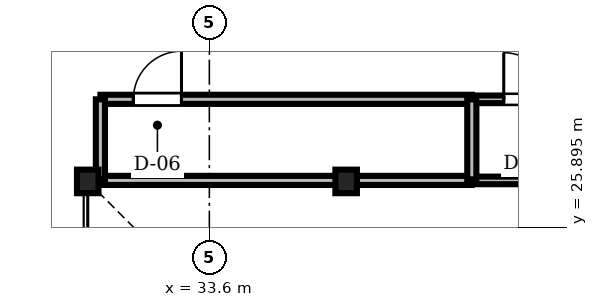
"""IFC4 building model, lengths in metres.
Left out: names, types, materials, properties, quantities, classifications, styles, units other than length and angle.
Written with IfcOpenShell. Run it as: python <this file> out.ifc"""

import sys

from ifc_helpers import new_model, si_unit, direction, frame, frame_2d, origin, origin_2d, place, context, subcontext, project, spatial, rectangle, i_section, extrude, source, transform, mapped, element, fill, save


model = new_model("IFC4")
c1 = context("Model", 3, precision=1e-05, world=origin(), true_north=direction((0.0, 1.0)))
c2 = subcontext(c1, "Body", "Model", "MODEL_VIEW")
j1 = project(units=[si_unit("LENGTHUNIT", "METRE"), si_unit("PLANEANGLEUNIT", "RADIAN")], contexts=[c1])
p1 = place(None, origin())
s1 = spatial("IfcSite", under=j1, at=p1, CompositionType="ELEMENT")
p2 = place(p1, origin())
s2 = spatial("IfcBuilding", under=s1, at=p2, CompositionType="ELEMENT")
p3 = place(p2, frame((0.0, 0.0, 107.5)))
s3 = spatial("IfcBuildingStorey", under=s2, at=p3, CompositionType="ELEMENT", Elevation=107.5)
m1 = source(origin(), c2, "Body", "SweptSolid", [
    extrude(i_section(OverallWidth=0.424, OverallDepth=0.465, WebThickness=0.035, FlangeThickness=0.056, FilletRadius=0.015, at=origin_2d()), origin(), (0.0, 0.0, 1.0), 3.56),
])
for number, where, z_axis, x_axis in (
    (1, (36.3, 26.8, 0.0), (0.0, 0.0, 1.0), (1.0, 0.0, 0.0)),
    (2, (31.2, 26.8, 0.0), (0.0, 0.0, 1.0), (1.0, 0.0, 0.0)),
):
    element("IfcColumn", number, at=place(p3, frame(where, z_axis=z_axis, x_axis=x_axis)), inside=s3, PredefinedType="COLUMN", context=c2, shape_type="MappedRepresentation", body=[
        mapped(m1, transform((0.0, 0.0, 0.0), scale=1.0)),
    ])
m2 = source(origin(), c2, "Body", "SweptSolid", [
    extrude(rectangle(XDim=7.33, YDim=0.18, at=frame_2d((3.665, 0.0))), origin(), (0.0, 0.0, 1.0), 3.192),
])
p4 = place(p3, frame((31.45, 28.42, 0.0), z_axis=(0.0, 0.0, 1.0), x_axis=(1.0, 0.0, 0.0)))
e3 = element("IfcWall", 3, at=p4, inside=s3, PredefinedType="PARTITIONING", context=c2, shape_type="MappedRepresentation", body=[
    mapped(m2, transform((0.0, 0.0, 0.0), scale=1.0)),
])
m3 = source(origin(), c2, "Body", "SweptSolid", [
    extrude(rectangle(XDim=0.95, YDim=2.15, at=frame_2d((0.475, 1.075))), frame((0.0, 0.1, 0.0), z_axis=(0.0, -1.0, 0.0), x_axis=(1.0, 0.0, 0.0)), (0.0, 0.0, 1.0), 0.2),
])
p5 = place(p4, frame((0.65, 0.0, 0.0)))
e4 = element("IfcOpeningElement", 4, at=p5, cuts=e3, PredefinedType="OPENING", context=c2, shape_type="MappedRepresentation", body=[
    mapped(m3, transform((0.0, 0.0, 0.0), scale=1.0)),
])
m4 = source(origin(), c2, "Body", "SweptSolid", [
    extrude(rectangle(XDim=2.74, YDim=0.15, at=frame_2d((1.37, 0.0))), origin(), (0.0, 0.0, 1.0), 3.56),
])
p6 = place(p3, frame((38.78, 28.42, 0.0), z_axis=(0.0, 0.0, 1.0), x_axis=(1.0, 0.0, 0.0)))
e5 = element("IfcWall", 5, at=p6, inside=s3, PredefinedType="PARTITIONING", context=c2, shape_type="MappedRepresentation", body=[
    mapped(m4, transform((0.0, 0.0, 0.0), scale=1.0)),
])
m5 = source(origin(), c2, "Body", "SweptSolid", [
    extrude(rectangle(XDim=0.92, YDim=2.1, at=frame_2d((0.46, 1.05))), frame((0.0, 0.085, 0.0), z_axis=(0.0, -1.0, 0.0), x_axis=(1.0, 0.0, 0.0)), (0.0, 0.0, 1.0), 0.17),
])
p7 = place(p6, frame((0.63, 0.0, 0.0)))
e6 = element("IfcOpeningElement", 6, at=p7, cuts=e5, PredefinedType="OPENING", context=c2, shape_type="MappedRepresentation", body=[
    mapped(m5, transform((0.0, 0.0, 0.0), scale=1.0)),
])
m6 = source(origin(), c2, "Body", "SweptSolid", [
    extrude(rectangle(XDim=7.33, YDim=0.18, at=frame_2d((3.665, 0.0))), origin(), (0.0, 0.0, 1.0), 3.102),
])
p8 = place(p3, frame((31.45, 26.82, 0.0), z_axis=(0.0, 0.0, 1.0), x_axis=(1.0, 0.0, 0.0)))
e7 = element("IfcWall", 7, at=p8, inside=s3, PredefinedType="PARTITIONING", context=c2, shape_type="MappedRepresentation", body=[
    mapped(m6, transform((0.0, 0.0, 0.0), scale=1.0)),
])
m7 = source(origin(), c2, "Body", "SweptSolid", [
    extrude(rectangle(XDim=2.74, YDim=0.15, at=frame_2d((1.37, 0.0))), origin(), (0.0, 0.0, 1.0), 2.952),
])
p9 = place(p3, frame((38.78, 26.82, 0.0), z_axis=(0.0, 0.0, 1.0), x_axis=(1.0, 0.0, 0.0)))
e8 = element("IfcWall", 8, at=p9, inside=s3, PredefinedType="PARTITIONING", context=c2, shape_type="MappedRepresentation", body=[
    mapped(m7, transform((0.0, 0.0, 0.0), scale=1.0)),
])
m8 = source(origin(), c2, "Body", "SweptSolid", [
    extrude(rectangle(XDim=1.6, YDim=0.18, at=frame_2d((0.8, 0.0))), origin(), (0.0, 0.0, 1.0), 3.102),
])
for number, where, z_axis, x_axis in (
    (9, (31.45, 26.82, 0.0), (0.0, 0.0, 1.0), (0.0, 1.0, 0.0)),
    (10, (38.78, 26.82, 0.0), (0.0, 0.0, 1.0), (0.0, 1.0, 0.0)),
):
    element("IfcWall", number, at=place(p3, frame(where, z_axis=z_axis, x_axis=x_axis)), inside=s3, PredefinedType="PARTITIONING", context=c2, shape_type="MappedRepresentation", body=[
        mapped(m8, transform((0.0, 0.0, 0.0), scale=1.0)),
    ])
m9 = source(origin(), c2, "Body", "SweptSolid", [
    extrude(rectangle(XDim=0.95, YDim=2.15, at=frame_2d((0.475, 1.075))), frame((0.0, 0.025, 0.0), z_axis=(0.0, -1.0, 0.0), x_axis=(1.0, 0.0, 0.0)), (0.0, 0.0, 1.0), 0.05),
])
p10 = place(p5, origin())
e11 = element("IfcDoor", 11, at=p10, inside=s3, OperationType="SINGLE_SWING_RIGHT", PredefinedType="DOOR", context=c2, shape_type="MappedRepresentation", body=[
    mapped(m9, transform((0.0, 0.0, 0.0), scale=1.0)),
])
fill(e4, e11)
m10 = source(origin(), c2, "Body", "SweptSolid", [
    extrude(rectangle(XDim=0.92, YDim=2.1, at=frame_2d((0.46, 1.05))), frame((0.0, 0.025, 0.0), z_axis=(0.0, -1.0, 0.0), x_axis=(1.0, 0.0, 0.0)), (0.0, 0.0, 1.0), 0.05),
])
p11 = place(p7, origin())
e12 = element("IfcDoor", 12, at=p11, inside=s3, OperationType="SINGLE_SWING_LEFT", PredefinedType="DOOR", context=c2, shape_type="MappedRepresentation", body=[
    mapped(m10, transform((0.0, 0.0, 0.0), scale=1.0)),
])
fill(e6, e12)
save(model, sys.argv[1])
